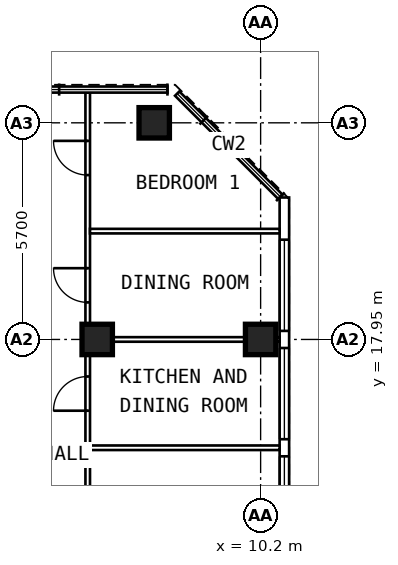
"""IFC4 building model, lengths in metres.
Left out: names, types, materials, properties, quantities, classifications, styles, units other than length and angle.
Written with IfcOpenShell. Run it as: python <this file> out.ifc"""

import sys

from ifc_helpers import new_model, si_unit, direction, frame, frame_2d, origin, origin_2d, place, context, subcontext, project, spatial, rectangle, extrude, element, fill, save


model = new_model("IFC4")
c1 = context("Model", 3, precision=1e-05, world=origin(), true_north=direction((0.0, 1.0)))
c2 = subcontext(c1, "Body", "Model", "MODEL_VIEW")
j1 = project(units=[si_unit("LENGTHUNIT", "METRE"), si_unit("PLANEANGLEUNIT", "RADIAN")], contexts=[c1])
p1 = place(None, origin())
s1 = spatial("IfcSite", under=j1, at=p1, CompositionType="ELEMENT")
p2 = place(p1, origin())
s2 = spatial("IfcBuilding", under=s1, at=p2, CompositionType="ELEMENT")
p3 = place(p2, frame((0.0, 0.0, 278.2)))
s3 = spatial("IfcBuildingStorey", under=s2, at=p3, CompositionType="ELEMENT", Elevation=278.2)
for number, where, z_axis, x_axis in (
    (1, (10.2, 17.95, 0.0), (0.0, 0.0, 1.0), (0.0, 1.0, 0.0)),
    (2, (7.4, 23.65, 0.0), (0.0, 0.0, 1.0), (0.0, 1.0, 0.0)),
    (3, (5.9, 17.95, 0.0), (0.0, 0.0, 1.0), (0.0, 1.0, 0.0)),
):
    element("IfcColumn", number, at=place(p3, frame(where, z_axis=z_axis, x_axis=x_axis)), inside=s3, PredefinedType="COLUMN", context=c2, shape_type="SweptSolid", body=[
        extrude(rectangle(XDim=0.8, YDim=0.8, at=origin_2d()), origin(), (0.0, 0.0, 1.0), 3.6),
    ])
p4 = place(p3, frame((10.825, 6.409, 0.0), z_axis=(0.0, 0.0, 1.0), x_axis=(0.0, 1.0, 0.0)))
e4 = element("IfcWall", 4, at=p4, inside=s3, PredefinedType="SOLIDWALL", context=c2, shape_type="SweptSolid", body=[
    extrude(rectangle(XDim=15.276, YDim=0.25, at=frame_2d((7.638, 0.0))), origin(), (0.0, 0.0, 1.0), 3.35),
])
p5 = place(p4, frame((0.366, 0.0, 0.6)))
e5 = element("IfcOpeningElement", 5, at=p5, cuts=e4, PredefinedType="OPENING", context=c2, shape_type="SweptSolid", body=[
    extrude(rectangle(XDim=2.4, YDim=2.0, at=frame_2d((1.2, 1.0))), frame((0.0, 0.137, 0.0), z_axis=(0.0, -1.0, 0.0), x_axis=(1.0, 0.0, 0.0)), (0.0, 0.0, 1.0), 0.274),
])
p6 = place(p4, frame((3.216, 0.0, 0.6)))
e6 = element("IfcOpeningElement", 6, at=p6, cuts=e4, PredefinedType="OPENING", context=c2, shape_type="SweptSolid", body=[
    extrude(rectangle(XDim=2.4, YDim=2.0, at=frame_2d((1.2, 1.0))), frame((0.0, 0.137, 0.0), z_axis=(0.0, -1.0, 0.0), x_axis=(1.0, 0.0, 0.0)), (0.0, 0.0, 1.0), 0.274),
])
p7 = place(p4, frame((6.066, 0.0, 0.6)))
e7 = element("IfcOpeningElement", 7, at=p7, cuts=e4, PredefinedType="OPENING", context=c2, shape_type="SweptSolid", body=[
    extrude(rectangle(XDim=2.4, YDim=2.0, at=frame_2d((1.2, 1.0))), frame((0.0, 0.137, 0.0), z_axis=(0.0, -1.0, 0.0), x_axis=(1.0, 0.0, 0.0)), (0.0, 0.0, 1.0), 0.274),
])
p8 = place(p4, frame((8.916, 0.0, 0.6)))
e8 = element("IfcOpeningElement", 8, at=p8, cuts=e4, PredefinedType="OPENING", context=c2, shape_type="SweptSolid", body=[
    extrude(rectangle(XDim=2.4, YDim=2.0, at=frame_2d((1.2, 1.0))), frame((0.0, 0.137, 0.0), z_axis=(0.0, -1.0, 0.0), x_axis=(1.0, 0.0, 0.0)), (0.0, 0.0, 1.0), 0.274),
])
p9 = place(p4, frame((11.766, 0.0, 0.6)))
e9 = element("IfcOpeningElement", 9, at=p9, cuts=e4, PredefinedType="OPENING", context=c2, shape_type="SweptSolid", body=[
    extrude(rectangle(XDim=2.4, YDim=2.0, at=frame_2d((1.2, 1.0))), frame((0.0, 0.137, 0.0), z_axis=(0.0, -1.0, 0.0), x_axis=(1.0, 0.0, 0.0)), (0.0, 0.0, 1.0), 0.274),
])
p10 = place(p3, frame((5.65, 9.6, 0.0), z_axis=(0.0, 0.0, 1.0), x_axis=(0.0, 1.0, 0.0)))
e10 = element("IfcWall", 10, at=p10, inside=s3, PredefinedType="PARTITIONING", context=c2, shape_type="SweptSolid", body=[
    extrude(rectangle(XDim=14.845, YDim=0.12, at=frame_2d((7.422, 0.0))), origin(), (0.0, 0.0, 1.0), 3.35),
])
p11 = place(p10, frame((3.2, 0.0, 0.0)))
e11 = element("IfcOpeningElement", 11, at=p11, cuts=e10, PredefinedType="OPENING", context=c2, shape_type="SweptSolid", body=[
    extrude(rectangle(XDim=0.9, YDim=2.1, at=frame_2d((0.45, 1.05))), frame((0.0, 0.072, 0.0), z_axis=(0.0, -1.0, 0.0), x_axis=(1.0, 0.0, 0.0)), (0.0, 0.0, 1.0), 0.144),
])
p12 = place(p10, frame((6.475, 0.0, 0.0)))
e12 = element("IfcOpeningElement", 12, at=p12, cuts=e10, PredefinedType="OPENING", context=c2, shape_type="SweptSolid", body=[
    extrude(rectangle(XDim=0.9, YDim=2.1, at=frame_2d((0.45, 1.05))), frame((0.0, 0.072, 0.0), z_axis=(0.0, -1.0, 0.0), x_axis=(1.0, 0.0, 0.0)), (0.0, 0.0, 1.0), 0.144),
])
p13 = place(p10, frame((9.325, 0.0, 0.0)))
e13 = element("IfcOpeningElement", 13, at=p13, cuts=e10, PredefinedType="OPENING", context=c2, shape_type="SweptSolid", body=[
    extrude(rectangle(XDim=0.9, YDim=2.1, at=frame_2d((0.45, 1.05))), frame((0.0, 0.072, 0.0), z_axis=(0.0, -1.0, 0.0), x_axis=(1.0, 0.0, 0.0)), (0.0, 0.0, 1.0), 0.144),
])
p14 = place(p10, frame((12.675, 0.0, 0.0)))
e14 = element("IfcOpeningElement", 14, at=p14, cuts=e10, PredefinedType="OPENING", context=c2, shape_type="SweptSolid", body=[
    extrude(rectangle(XDim=0.9, YDim=2.1, at=frame_2d((0.45, 1.05))), frame((0.0, 0.072, 0.0), z_axis=(0.0, -1.0, 0.0), x_axis=(1.0, 0.0, 0.0)), (0.0, 0.0, 1.0), 0.144),
])
p15 = place(p3, frame((5.71, 15.1, 0.0), z_axis=(0.0, 0.0, 1.0), x_axis=(1.0, 0.0, 0.0)))
e15 = element("IfcWall", 15, at=p15, inside=s3, PredefinedType="PARTITIONING", context=c2, shape_type="SweptSolid", body=[
    extrude(rectangle(XDim=4.99, YDim=0.12, at=frame_2d((2.495, 0.0))), origin(), (0.0, 0.0, 1.0), 3.35),
])
p16 = place(p3, frame((5.71, 17.95, 0.0), z_axis=(0.0, 0.0, 1.0), x_axis=(1.0, 0.0, 0.0)))
e16 = element("IfcWall", 16, at=p16, inside=s3, PredefinedType="PARTITIONING", context=c2, shape_type="SweptSolid", body=[
    extrude(rectangle(XDim=4.99, YDim=0.12, at=frame_2d((2.495, 0.0))), origin(), (0.0, 0.0, 1.0), 2.45),
])
p17 = place(p3, frame((5.71, 20.8, 0.0), z_axis=(0.0, 0.0, 1.0), x_axis=(1.0, 0.0, 0.0)))
e17 = element("IfcWall", 17, at=p17, inside=s3, PredefinedType="PARTITIONING", context=c2, shape_type="SweptSolid", body=[
    extrude(rectangle(XDim=4.99, YDim=0.12, at=frame_2d((2.495, 0.0))), origin(), (0.0, 0.0, 1.0), 3.35),
])
p18 = place(p7, origin())
e18 = element("IfcWindow", 18, at=p18, inside=s3, PartitioningType="SINGLE_PANEL", PredefinedType="WINDOW", context=c2, shape_type="SweptSolid", body=[
    extrude(rectangle(XDim=2.4, YDim=2.0, at=frame_2d((1.2, 1.0))), frame((0.0, 0.03, 0.0), z_axis=(0.0, -1.0, 0.0), x_axis=(1.0, 0.0, 0.0)), (0.0, 0.0, 1.0), 0.06),
])
fill(e7, e18)
p19 = place(p8, origin())
e19 = element("IfcWindow", 19, at=p19, inside=s3, PartitioningType="SINGLE_PANEL", PredefinedType="WINDOW", context=c2, shape_type="SweptSolid", body=[
    extrude(rectangle(XDim=2.4, YDim=2.0, at=frame_2d((1.2, 1.0))), frame((0.0, 0.03, 0.0), z_axis=(0.0, -1.0, 0.0), x_axis=(1.0, 0.0, 0.0)), (0.0, 0.0, 1.0), 0.06),
])
fill(e8, e19)
p20 = place(p9, origin())
e20 = element("IfcWindow", 20, at=p20, inside=s3, PartitioningType="SINGLE_PANEL", PredefinedType="WINDOW", context=c2, shape_type="SweptSolid", body=[
    extrude(rectangle(XDim=2.4, YDim=2.0, at=frame_2d((1.2, 1.0))), frame((0.0, 0.03, 0.0), z_axis=(0.0, -1.0, 0.0), x_axis=(1.0, 0.0, 0.0)), (0.0, 0.0, 1.0), 0.06),
])
fill(e9, e20)
p21 = place(p12, origin())
e21 = element("IfcDoor", 21, at=p21, inside=s3, OperationType="SINGLE_SWING_LEFT", PredefinedType="DOOR", context=c2, shape_type="SweptSolid", body=[
    extrude(rectangle(XDim=0.9, YDim=2.1, at=frame_2d((0.45, 1.05))), frame((0.0, 0.025, 0.0), z_axis=(0.0, -1.0, 0.0), x_axis=(1.0, 0.0, 0.0)), (0.0, 0.0, 1.0), 0.05),
])
fill(e12, e21)
p22 = place(p13, origin())
e22 = element("IfcDoor", 22, at=p22, inside=s3, OperationType="SINGLE_SWING_RIGHT", PredefinedType="DOOR", context=c2, shape_type="SweptSolid", body=[
    extrude(rectangle(XDim=0.9, YDim=2.1, at=frame_2d((0.45, 1.05))), frame((0.0, 0.025, 0.0), z_axis=(0.0, -1.0, 0.0), x_axis=(1.0, 0.0, 0.0)), (0.0, 0.0, 1.0), 0.05),
])
fill(e13, e22)
p23 = place(p14, origin())
e23 = element("IfcDoor", 23, at=p23, inside=s3, OperationType="SINGLE_SWING_RIGHT", PredefinedType="DOOR", context=c2, shape_type="SweptSolid", body=[
    extrude(rectangle(XDim=0.9, YDim=2.1, at=frame_2d((0.45, 1.05))), frame((0.0, 0.025, 0.0), z_axis=(0.0, -1.0, 0.0), x_axis=(1.0, 0.0, 0.0)), (0.0, 0.0, 1.0), 0.05),
])
fill(e14, e23)
save(model, sys.argv[1])
